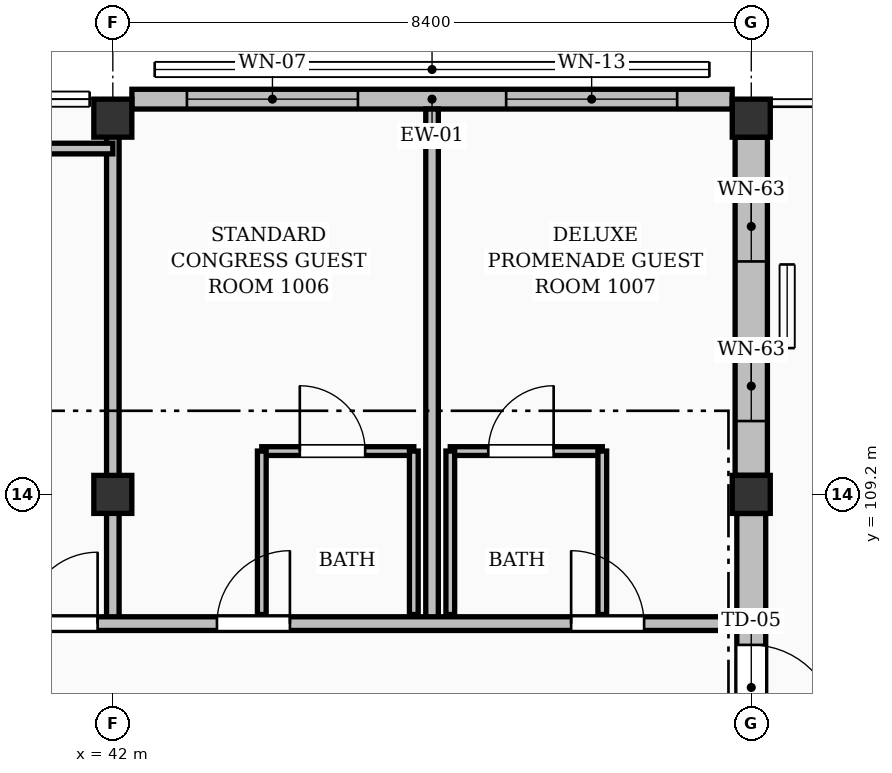
"""IFC4 building model, lengths in metres.
Left out: names, types, materials, properties, quantities, classifications, styles, units other than length and angle.
Written with IfcOpenShell. Run it as: python <this file> out.ifc"""

import sys

from ifc_helpers import new_model, si_unit, direction, frame, frame_2d, origin, origin_2d, place, context, subcontext, project, spatial, rectangle, extrude, element, fill, save


model = new_model("IFC4")
c1 = context("Model", 3, precision=1e-05, world=origin(), true_north=direction((0.0, 1.0)))
c2 = subcontext(c1, "Body", "Model", "MODEL_VIEW")
j1 = project(units=[si_unit("LENGTHUNIT", "METRE"), si_unit("PLANEANGLEUNIT", "RADIAN")], contexts=[c1])
p1 = place(None, origin())
s1 = spatial("IfcSite", under=j1, at=p1, CompositionType="ELEMENT")
p2 = place(p1, origin())
s2 = spatial("IfcBuilding", under=s1, at=p2, CompositionType="ELEMENT")
p3 = place(p2, frame((0.0, 0.0, 35.28)))
s3 = spatial("IfcBuildingStorey", under=s2, at=p3, CompositionType="ELEMENT", Elevation=35.28)
for number, where, z_axis, x_axis in (
    (1, (42.0, 109.2, 0.0), (0.0, 0.0, 1.0), (1.0, 0.0, 0.0)),
    (2, (42.0, 114.15, 0.0), (0.0, 0.0, 1.0), (1.0, 0.0, 0.0)),
    (3, (50.4, 109.2, 0.0), (0.0, 0.0, 1.0), (1.0, 0.0, 0.0)),
    (4, (50.4, 114.15, 0.0), (0.0, 0.0, 1.0), (1.0, 0.0, 0.0)),
):
    element("IfcColumn", number, at=place(p3, frame(where, z_axis=z_axis, x_axis=x_axis)), inside=s3, PredefinedType="COLUMN", context=c2, shape_type="SweptSolid", body=[
        extrude(rectangle(XDim=0.5, YDim=0.5, at=origin_2d()), origin(), (0.0, 0.0, 1.0), 3.36),
    ])
p4 = place(p3, frame((42.251, 114.4, 0.0), z_axis=(0.0, 0.0, 1.0), x_axis=(1.0, 0.0, 0.0)))
e5 = element("IfcWall", 5, at=p4, inside=s3, PredefinedType="SOLIDWALL", context=c2, shape_type="SweptSolid", body=[
    extrude(rectangle(XDim=7.898, YDim=0.26, at=frame_2d((3.949, 0.0))), origin(), (0.0, 0.0, 1.0), 2.514),
])
p5 = place(p4, frame((0.724, 0.0, 0.25)))
e6 = element("IfcOpeningElement", 6, at=p5, cuts=e5, PredefinedType="OPENING", context=c2, shape_type="SweptSolid", body=[
    extrude(rectangle(XDim=2.25, YDim=1.95, at=frame_2d((1.125, 0.975))), frame((0.0, 0.14, 0.0), z_axis=(0.0, -1.0, 0.0), x_axis=(1.0, 0.0, 0.0)), (0.0, 0.0, 1.0), 0.28),
])
p6 = place(p4, frame((4.924, 0.0, 0.25)))
e7 = element("IfcOpeningElement", 7, at=p6, cuts=e5, PredefinedType="OPENING", context=c2, shape_type="SweptSolid", body=[
    extrude(rectangle(XDim=2.25, YDim=2.05, at=frame_2d((1.125, 1.025))), frame((0.0, 0.14, 0.0), z_axis=(0.0, -1.0, 0.0), x_axis=(1.0, 0.0, 0.0)), (0.0, 0.0, 1.0), 0.28),
])
p7 = place(p3, frame((50.4, 101.051, 0.0), z_axis=(0.0, 0.0, 1.0), x_axis=(0.0, 1.0, 0.0)))
e8 = element("IfcWall", 8, at=p7, inside=s3, PredefinedType="SOLIDWALL", context=c2, shape_type="SweptSolid", body=[
    extrude(rectangle(XDim=7.898, YDim=0.38, at=frame_2d((3.949, 0.0))), origin(), (0.0, 0.0, 1.0), 2.514),
])
p8 = place(p7, frame((5.049, 0.0, 0.0)))
e9 = element("IfcOpeningElement", 9, at=p8, cuts=e8, PredefinedType="OPENING", context=c2, shape_type="SweptSolid", body=[
    extrude(rectangle(XDim=1.12, YDim=2.05, at=frame_2d((0.56, 1.025))), frame((0.0, 0.2, 0.0), z_axis=(0.0, -1.0, 0.0), x_axis=(1.0, 0.0, 0.0)), (0.0, 0.0, 1.0), 0.4),
])
p9 = place(p3, frame((50.4, 109.451, 0.0), z_axis=(0.0, 0.0, 1.0), x_axis=(0.0, 1.0, 0.0)))
e10 = element("IfcWall", 10, at=p9, inside=s3, PredefinedType="SOLIDWALL", context=c2, shape_type="SweptSolid", body=[
    extrude(rectangle(XDim=4.448, YDim=0.425, at=frame_2d((2.224, 0.0))), origin(), (0.0, 0.0, 1.0), 2.514),
])
p10 = place(p9, frame((0.714, 0.0, 0.3)))
e11 = element("IfcOpeningElement", 11, at=p10, cuts=e10, PredefinedType="OPENING", context=c2, shape_type="SweptSolid", body=[
    extrude(rectangle(XDim=0.92, YDim=1.75, at=frame_2d((0.46, 0.875))), frame((0.0, 0.223, 0.0), z_axis=(0.0, -1.0, 0.0), x_axis=(1.0, 0.0, 0.0)), (0.0, 0.0, 1.0), 0.445),
])
p11 = place(p9, frame((2.814, 0.0, 0.3)))
e12 = element("IfcOpeningElement", 12, at=p11, cuts=e10, PredefinedType="OPENING", context=c2, shape_type="SweptSolid", body=[
    extrude(rectangle(XDim=0.92, YDim=1.75, at=frame_2d((0.46, 0.875))), frame((0.0, 0.223, 0.0), z_axis=(0.0, -1.0, 0.0), x_axis=(1.0, 0.0, 0.0)), (0.0, 0.0, 1.0), 0.445),
])
p12 = place(p3, frame((43.96, 109.77, 0.0), z_axis=(0.0, 0.0, 1.0), x_axis=(1.0, 0.0, 0.0)))
e13 = element("IfcWall", 13, at=p12, inside=s3, PredefinedType="PARTITIONING", context=c2, shape_type="SweptSolid", body=[
    extrude(rectangle(XDim=2.0, YDim=0.115, at=frame_2d((1.0, 0.0))), origin(), (0.0, 0.0, 1.0), 3.14),
])
p13 = place(p12, frame((0.5, 0.0, 0.0)))
e14 = element("IfcOpeningElement", 14, at=p13, cuts=e13, PredefinedType="OPENING", context=c2, shape_type="SweptSolid", body=[
    extrude(rectangle(XDim=0.86, YDim=2.05, at=frame_2d((0.43, 1.025))), frame((0.0, 0.067, 0.0), z_axis=(0.0, -1.0, 0.0), x_axis=(1.0, 0.0, 0.0)), (0.0, 0.0, 1.0), 0.135),
])
for number, where, z_axis, x_axis in (
    (15, (43.96, 107.62, 0.0), (0.0, 0.0, 1.0), (0.0, 1.0, 0.0)),
    (16, (45.96, 107.62, 0.0), (0.0, 0.0, 1.0), (0.0, 1.0, 0.0)),
):
    element("IfcWall", number, at=place(p3, frame(where, z_axis=z_axis, x_axis=x_axis)), inside=s3, PredefinedType="PARTITIONING", context=c2, shape_type="SweptSolid", body=[
        extrude(rectangle(XDim=2.15, YDim=0.115, at=frame_2d((1.075, 0.0))), origin(), (0.0, 0.0, 1.0), 3.14),
    ])
p14 = place(p3, frame((46.44, 109.77, 0.0), z_axis=(0.0, 0.0, 1.0), x_axis=(1.0, 0.0, 0.0)))
e17 = element("IfcWall", 17, at=p14, inside=s3, PredefinedType="PARTITIONING", context=c2, shape_type="SweptSolid", body=[
    extrude(rectangle(XDim=2.0, YDim=0.115, at=frame_2d((1.0, 0.0))), origin(), (0.0, 0.0, 1.0), 3.14),
])
p15 = place(p14, frame((0.5, 0.0, 0.0)))
e18 = element("IfcOpeningElement", 18, at=p15, cuts=e17, PredefinedType="OPENING", context=c2, shape_type="SweptSolid", body=[
    extrude(rectangle(XDim=0.86, YDim=2.05, at=frame_2d((0.43, 1.025))), frame((0.0, 0.067, 0.0), z_axis=(0.0, -1.0, 0.0), x_axis=(1.0, 0.0, 0.0)), (0.0, 0.0, 1.0), 0.135),
])
for number, where, z_axis, x_axis in (
    (19, (46.44, 107.62, 0.0), (0.0, 0.0, 1.0), (0.0, 1.0, 0.0)),
    (20, (48.44, 107.62, 0.0), (0.0, 0.0, 1.0), (0.0, 1.0, 0.0)),
):
    element("IfcWall", number, at=place(p3, frame(where, z_axis=z_axis, x_axis=x_axis)), inside=s3, PredefinedType="PARTITIONING", context=c2, shape_type="SweptSolid", body=[
        extrude(rectangle(XDim=2.15, YDim=0.115, at=frame_2d((1.075, 0.0))), origin(), (0.0, 0.0, 1.0), 3.14),
    ])
p16 = place(p3, frame((46.2, 107.5, 0.0), z_axis=(0.0, 0.0, 1.0), x_axis=(0.0, 1.0, 0.0)))
e21 = element("IfcWall", 21, at=p16, inside=s3, PredefinedType="PARTITIONING", context=c2, shape_type="SweptSolid", body=[
    extrude(rectangle(XDim=6.77, YDim=0.165, at=frame_2d((3.385, 0.0))), origin(), (0.0, 0.0, 1.0), 3.14),
])
p17 = place(p3, frame((42.0, 107.5, 0.0), z_axis=(0.0, 0.0, 1.0), x_axis=(0.0, 1.0, 0.0)))
e22 = element("IfcWall", 22, at=p17, inside=s3, PredefinedType="PARTITIONING", context=c2, shape_type="SweptSolid", body=[
    extrude(rectangle(XDim=6.55, YDim=0.165, at=frame_2d((3.275, 0.0))), origin(), (0.0, 0.0, 1.0), 2.514),
])
p18 = place(p3, frame((40.66, 107.5, 0.0), z_axis=(0.0, 0.0, 1.0), x_axis=(1.0, 0.0, 0.0)))
e23 = element("IfcWall", 23, at=p18, inside=s3, PredefinedType="PARTITIONING", context=c2, shape_type="SweptSolid", body=[
    extrude(rectangle(XDim=9.55, YDim=0.18, at=frame_2d((4.775, 0.0))), origin(), (0.0, 0.0, 1.0), 3.14),
])
p19 = place(p18, frame((0.2, 0.0, 0.0)))
e24 = element("IfcOpeningElement", 24, at=p19, cuts=e23, PredefinedType="OPENING", context=c2, shape_type="SweptSolid", body=[
    extrude(rectangle(XDim=0.94, YDim=2.1, at=frame_2d((0.47, 1.05))), frame((0.0, 0.1, 0.0), z_axis=(0.0, -1.0, 0.0), x_axis=(1.0, 0.0, 0.0)), (0.0, 0.0, 1.0), 0.2),
])
p20 = place(p18, frame((2.71, 0.0, 0.0)))
e25 = element("IfcOpeningElement", 25, at=p20, cuts=e23, PredefinedType="OPENING", context=c2, shape_type="SweptSolid", body=[
    extrude(rectangle(XDim=0.96, YDim=2.15, at=frame_2d((0.48, 1.075))), frame((0.0, 0.1, 0.0), z_axis=(0.0, -1.0, 0.0), x_axis=(1.0, 0.0, 0.0)), (0.0, 0.0, 1.0), 0.2),
])
p21 = place(p18, frame((7.37, 0.0, 0.0)))
e26 = element("IfcOpeningElement", 26, at=p21, cuts=e23, PredefinedType="OPENING", context=c2, shape_type="SweptSolid", body=[
    extrude(rectangle(XDim=0.96, YDim=2.15, at=frame_2d((0.48, 1.075))), frame((0.0, 0.1, 0.0), z_axis=(0.0, -1.0, 0.0), x_axis=(1.0, 0.0, 0.0)), (0.0, 0.0, 1.0), 0.2),
])
p22 = place(p3, frame((39.33, 113.75, 0.0), z_axis=(0.0, 0.0, 1.0), x_axis=(1.0, 0.0, 0.0)))
e27 = element("IfcWall", 27, at=p22, inside=s3, PredefinedType="PARTITIONING", context=c2, shape_type="SweptSolid", body=[
    extrude(rectangle(XDim=2.67, YDim=0.14, at=frame_2d((1.335, 0.0))), origin(), (0.0, 0.0, 1.0), 3.14),
])
p23 = place(p5, origin())
e28 = element("IfcWindow", 28, at=p23, inside=s3, PartitioningType="DOUBLE_PANEL_VERTICAL", PredefinedType="WINDOW", context=c2, shape_type="SweptSolid", body=[
    extrude(rectangle(XDim=2.25, YDim=1.95, at=frame_2d((1.125, 0.975))), frame((0.0, 0.03, 0.0), z_axis=(0.0, -1.0, 0.0), x_axis=(1.0, 0.0, 0.0)), (0.0, 0.0, 1.0), 0.06),
])
fill(e6, e28)
p24 = place(p6, origin())
e29 = element("IfcWindow", 29, at=p24, inside=s3, PartitioningType="DOUBLE_PANEL_VERTICAL", PredefinedType="WINDOW", context=c2, shape_type="SweptSolid", body=[
    extrude(rectangle(XDim=2.25, YDim=2.05, at=frame_2d((1.125, 1.025))), frame((0.0, 0.03, 0.0), z_axis=(0.0, -1.0, 0.0), x_axis=(1.0, 0.0, 0.0)), (0.0, 0.0, 1.0), 0.06),
])
fill(e7, e29)
p25 = place(p8, frame((1.12, 0.0, 0.0), z_axis=(0.0, 0.0, 1.0), x_axis=(-1.0, 0.0, 0.0)))
e30 = element("IfcDoor", 30, at=p25, inside=s3, OperationType="SINGLE_SWING_RIGHT", PredefinedType="DOOR", context=c2, shape_type="SweptSolid", body=[
    extrude(rectangle(XDim=1.12, YDim=2.05, at=frame_2d((0.56, 1.025))), frame((0.0, 0.025, 0.0), z_axis=(0.0, -1.0, 0.0), x_axis=(1.0, 0.0, 0.0)), (0.0, 0.0, 1.0), 0.05),
])
fill(e9, e30)
p26 = place(p10, origin())
e31 = element("IfcWindow", 31, at=p26, inside=s3, PartitioningType="SINGLE_PANEL", PredefinedType="WINDOW", context=c2, shape_type="SweptSolid", body=[
    extrude(rectangle(XDim=0.92, YDim=1.75, at=frame_2d((0.46, 0.875))), frame((0.0, 0.03, 0.0), z_axis=(0.0, -1.0, 0.0), x_axis=(1.0, 0.0, 0.0)), (0.0, 0.0, 1.0), 0.06),
])
fill(e11, e31)
p27 = place(p11, origin())
e32 = element("IfcWindow", 32, at=p27, inside=s3, PartitioningType="SINGLE_PANEL", PredefinedType="WINDOW", context=c2, shape_type="SweptSolid", body=[
    extrude(rectangle(XDim=0.92, YDim=1.75, at=frame_2d((0.46, 0.875))), frame((0.0, 0.03, 0.0), z_axis=(0.0, -1.0, 0.0), x_axis=(1.0, 0.0, 0.0)), (0.0, 0.0, 1.0), 0.06),
])
fill(e12, e32)
p28 = place(p13, origin())
e33 = element("IfcDoor", 33, at=p28, inside=s3, OperationType="SINGLE_SWING_LEFT", PredefinedType="DOOR", context=c2, shape_type="SweptSolid", body=[
    extrude(rectangle(XDim=0.86, YDim=2.05, at=frame_2d((0.43, 1.025))), frame((0.0, 0.025, 0.0), z_axis=(0.0, -1.0, 0.0), x_axis=(1.0, 0.0, 0.0)), (0.0, 0.0, 1.0), 0.05),
])
fill(e14, e33)
p29 = place(p15, origin())
e34 = element("IfcDoor", 34, at=p29, inside=s3, OperationType="SINGLE_SWING_RIGHT", PredefinedType="DOOR", context=c2, shape_type="SweptSolid", body=[
    extrude(rectangle(XDim=0.86, YDim=2.05, at=frame_2d((0.43, 1.025))), frame((0.0, 0.025, 0.0), z_axis=(0.0, -1.0, 0.0), x_axis=(1.0, 0.0, 0.0)), (0.0, 0.0, 1.0), 0.05),
])
fill(e18, e34)
p30 = place(p19, origin())
e35 = element("IfcDoor", 35, at=p30, inside=s3, OperationType="SINGLE_SWING_RIGHT", PredefinedType="DOOR", context=c2, shape_type="SweptSolid", body=[
    extrude(rectangle(XDim=0.94, YDim=2.1, at=frame_2d((0.47, 1.05))), frame((0.0, 0.025, 0.0), z_axis=(0.0, -1.0, 0.0), x_axis=(1.0, 0.0, 0.0)), (0.0, 0.0, 1.0), 0.05),
])
fill(e24, e35)
p31 = place(p20, origin())
e36 = element("IfcDoor", 36, at=p31, inside=s3, OperationType="SINGLE_SWING_RIGHT", PredefinedType="DOOR", context=c2, shape_type="SweptSolid", body=[
    extrude(rectangle(XDim=0.96, YDim=2.15, at=frame_2d((0.48, 1.075))), frame((0.0, 0.025, 0.0), z_axis=(0.0, -1.0, 0.0), x_axis=(1.0, 0.0, 0.0)), (0.0, 0.0, 1.0), 0.05),
])
fill(e25, e36)
p32 = place(p21, origin())
e37 = element("IfcDoor", 37, at=p32, inside=s3, OperationType="SINGLE_SWING_LEFT", PredefinedType="DOOR", context=c2, shape_type="SweptSolid", body=[
    extrude(rectangle(XDim=0.96, YDim=2.15, at=frame_2d((0.48, 1.075))), frame((0.0, 0.025, 0.0), z_axis=(0.0, -1.0, 0.0), x_axis=(1.0, 0.0, 0.0)), (0.0, 0.0, 1.0), 0.05),
])
fill(e26, e37)
save(model, sys.argv[1])
